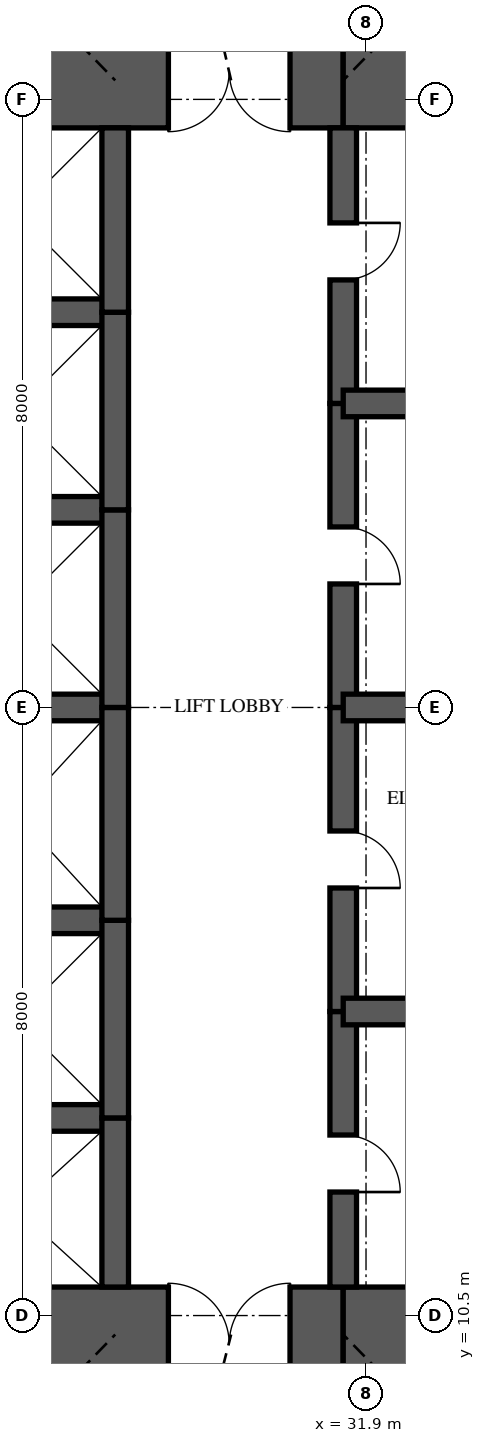
"""IFC4 building model, lengths in metres.
Left out: names, types, materials, properties, quantities, classifications, styles, units other than length and angle.
Written with IfcOpenShell. Run it as: python <this file> out.ifc"""

import sys

from ifc_helpers import new_model, si_unit, direction, frame, frame_2d, origin, place, context, subcontext, project, spatial, rectangle, extrude, element, fill, save


model = new_model("IFC4")
c1 = context("Model", 3, precision=1e-05, world=origin(), true_north=direction((0.0, 1.0)))
c2 = subcontext(c1, "Body", "Model", "MODEL_VIEW")
j1 = project(units=[si_unit("LENGTHUNIT", "METRE"), si_unit("PLANEANGLEUNIT", "RADIAN")], contexts=[c1])
p1 = place(None, origin())
s1 = spatial("IfcSite", under=j1, at=p1, CompositionType="ELEMENT")
p2 = place(p1, origin())
s2 = spatial("IfcBuilding", under=s1, at=p2, CompositionType="ELEMENT")
p3 = place(p2, frame((0.0, 0.0, 144.35)))
s3 = spatial("IfcBuildingStorey", under=s2, at=p3, CompositionType="ELEMENT", Elevation=144.35)
p4 = place(p3, frame((26.0, 10.125, 0.0), z_axis=(0.0, 0.0, 1.0), x_axis=(1.0, 0.0, 0.0)))
e1 = element("IfcWall", 1, at=p4, inside=s3, PredefinedType="SHEAR", context=c2, shape_type="SweptSolid", body=[
    extrude(rectangle(XDim=5.6, YDim=1.5, at=frame_2d((2.8, 0.0))), origin(), (0.0, 0.0, 1.0), 5.0),
])
p5 = place(p4, frame((3.3, 0.0, 0.0)))
e2 = element("IfcOpeningElement", 2, at=p5, cuts=e1, PredefinedType="OPENING", context=c2, shape_type="SweptSolid", body=[
    extrude(rectangle(XDim=1.6, YDim=2.1, at=frame_2d((0.8, 1.05))), frame((0.0, 0.76, 0.0), z_axis=(0.0, -1.0, 0.0), x_axis=(1.0, 0.0, 0.0)), (0.0, 0.0, 1.0), 1.52),
])
for number, where, z_axis, x_axis in (
    (3, (31.6, 10.125, 0.0), (0.0, 0.0, 1.0), (1.0, 0.0, 0.0)),
    (4, (35.9, 26.875, 0.0), (0.0, 0.0, 1.0), (-1.0, 0.0, 0.0)),
):
    element("IfcWall", number, at=place(p3, frame(where, z_axis=z_axis, x_axis=x_axis)), inside=s3, PredefinedType="SHEAR", context=c2, shape_type="SweptSolid", body=[
        extrude(rectangle(XDim=4.3, YDim=1.5, at=frame_2d((2.15, 0.0))), origin(), (0.0, 0.0, 1.0), 5.0),
    ])
p6 = place(p3, frame((31.6, 26.875, 0.0), z_axis=(0.0, 0.0, 1.0), x_axis=(-1.0, 0.0, 0.0)))
e5 = element("IfcWall", 5, at=p6, inside=s3, PredefinedType="SHEAR", context=c2, shape_type="SweptSolid", body=[
    extrude(rectangle(XDim=5.6, YDim=1.5, at=frame_2d((2.8, 0.0))), origin(), (0.0, 0.0, 1.0), 5.0),
])
p7 = place(p6, frame((0.7, 0.0, 0.0)))
e6 = element("IfcOpeningElement", 6, at=p7, cuts=e5, PredefinedType="OPENING", context=c2, shape_type="SweptSolid", body=[
    extrude(rectangle(XDim=1.6, YDim=2.1, at=frame_2d((0.8, 1.05))), frame((0.0, 0.76, 0.0), z_axis=(0.0, -1.0, 0.0), x_axis=(1.0, 0.0, 0.0)), (0.0, 0.0, 1.0), 1.52),
])
p8 = place(p3, frame((28.6, 10.875, 0.0), z_axis=(0.0, 0.0, 1.0), x_axis=(0.0, 1.0, 0.0)))
e7 = element("IfcWall", 7, at=p8, inside=s3, PredefinedType="SHEAR", context=c2, shape_type="SweptSolid", body=[
    extrude(rectangle(XDim=2.225, YDim=0.35, at=frame_2d((1.113, 0.0))), origin(), (0.0, 0.0, 1.0), 5.0),
])
p9 = place(p3, frame((28.6, 13.1, 0.0), z_axis=(0.0, 0.0, 1.0), x_axis=(0.0, 1.0, 0.0)))
e8 = element("IfcWall", 8, at=p9, inside=s3, PredefinedType="SHEAR", context=c2, shape_type="SweptSolid", body=[
    extrude(rectangle(XDim=2.6, YDim=0.35, at=frame_2d((1.3, 0.0))), origin(), (0.0, 0.0, 1.0), 5.0),
])
p10 = place(p3, frame((28.6, 15.7, 0.0), z_axis=(0.0, 0.0, 1.0), x_axis=(0.0, 1.0, 0.0)))
e9 = element("IfcWall", 9, at=p10, inside=s3, PredefinedType="SHEAR", context=c2, shape_type="SweptSolid", body=[
    extrude(rectangle(XDim=2.8, YDim=0.35, at=frame_2d((1.4, 0.0))), origin(), (0.0, 0.0, 1.0), 5.0),
])
p11 = place(p3, frame((28.6, 18.5, 0.0), z_axis=(0.0, 0.0, 1.0), x_axis=(0.0, 1.0, 0.0)))
e10 = element("IfcWall", 10, at=p11, inside=s3, PredefinedType="SHEAR", context=c2, shape_type="SweptSolid", body=[
    extrude(rectangle(XDim=2.6, YDim=0.35, at=frame_2d((1.3, 0.0))), origin(), (0.0, 0.0, 1.0), 5.0),
])
p12 = place(p3, frame((28.6, 21.1, 0.0), z_axis=(0.0, 0.0, 1.0), x_axis=(0.0, 1.0, 0.0)))
e11 = element("IfcWall", 11, at=p12, inside=s3, PredefinedType="SHEAR", context=c2, shape_type="SweptSolid", body=[
    extrude(rectangle(XDim=2.6, YDim=0.35, at=frame_2d((1.3, 0.0))), origin(), (0.0, 0.0, 1.0), 5.0),
])
p13 = place(p3, frame((28.6, 23.7, 0.0), z_axis=(0.0, 0.0, 1.0), x_axis=(0.0, 1.0, 0.0)))
e12 = element("IfcWall", 12, at=p13, inside=s3, PredefinedType="SHEAR", context=c2, shape_type="SweptSolid", body=[
    extrude(rectangle(XDim=2.425, YDim=0.35, at=frame_2d((1.212, 0.0))), origin(), (0.0, 0.0, 1.0), 5.0),
])
p14 = place(p3, frame((31.6, 10.875, 0.0), z_axis=(0.0, 0.0, 1.0), x_axis=(0.0, 1.0, 0.0)))
e13 = element("IfcWall", 13, at=p14, inside=s3, PredefinedType="SHEAR", context=c2, shape_type="SweptSolid", body=[
    extrude(rectangle(XDim=3.625, YDim=0.35, at=frame_2d((1.812, 0.0))), origin(), (0.0, 0.0, 1.0), 5.0),
])
p15 = place(p14, frame((1.25, 0.0, 0.0)))
e14 = element("IfcOpeningElement", 14, at=p15, cuts=e13, PredefinedType="OPENING", context=c2, shape_type="SweptSolid", body=[
    extrude(rectangle(XDim=0.75, YDim=2.1, at=frame_2d((0.375, 1.05))), frame((0.0, 0.185, 0.0), z_axis=(0.0, -1.0, 0.0), x_axis=(1.0, 0.0, 0.0)), (0.0, 0.0, 1.0), 0.37),
])
p16 = place(p3, frame((31.6, 14.5, 0.0), z_axis=(0.0, 0.0, 1.0), x_axis=(0.0, 1.0, 0.0)))
e15 = element("IfcWall", 15, at=p16, inside=s3, PredefinedType="SHEAR", context=c2, shape_type="SweptSolid", body=[
    extrude(rectangle(XDim=4.0, YDim=0.35, at=frame_2d((2.0, 0.0))), origin(), (0.0, 0.0, 1.0), 5.0),
])
p17 = place(p16, frame((1.625, 0.0, 0.0)))
e16 = element("IfcOpeningElement", 16, at=p17, cuts=e15, PredefinedType="OPENING", context=c2, shape_type="SweptSolid", body=[
    extrude(rectangle(XDim=0.75, YDim=2.1, at=frame_2d((0.375, 1.05))), frame((0.0, 0.185, 0.0), z_axis=(0.0, -1.0, 0.0), x_axis=(1.0, 0.0, 0.0)), (0.0, 0.0, 1.0), 0.37),
])
p18 = place(p3, frame((31.6, 18.5, 0.0), z_axis=(0.0, 0.0, 1.0), x_axis=(0.0, 1.0, 0.0)))
e17 = element("IfcWall", 17, at=p18, inside=s3, PredefinedType="SHEAR", context=c2, shape_type="SweptSolid", body=[
    extrude(rectangle(XDim=4.0, YDim=0.35, at=frame_2d((2.0, 0.0))), origin(), (0.0, 0.0, 1.0), 5.0),
])
p19 = place(p18, frame((1.625, 0.0, 0.0)))
e18 = element("IfcOpeningElement", 18, at=p19, cuts=e17, PredefinedType="OPENING", context=c2, shape_type="SweptSolid", body=[
    extrude(rectangle(XDim=0.75, YDim=2.1, at=frame_2d((0.375, 1.05))), frame((0.0, 0.185, 0.0), z_axis=(0.0, -1.0, 0.0), x_axis=(1.0, 0.0, 0.0)), (0.0, 0.0, 1.0), 0.37),
])
p20 = place(p3, frame((31.6, 22.5, 0.0), z_axis=(0.0, 0.0, 1.0), x_axis=(0.0, 1.0, 0.0)))
e19 = element("IfcWall", 19, at=p20, inside=s3, PredefinedType="SHEAR", context=c2, shape_type="SweptSolid", body=[
    extrude(rectangle(XDim=3.625, YDim=0.35, at=frame_2d((1.812, 0.0))), origin(), (0.0, 0.0, 1.0), 5.0),
])
p21 = place(p20, frame((1.625, 0.0, 0.0)))
e20 = element("IfcOpeningElement", 20, at=p21, cuts=e19, PredefinedType="OPENING", context=c2, shape_type="SweptSolid", body=[
    extrude(rectangle(XDim=0.75, YDim=2.1, at=frame_2d((0.375, 1.05))), frame((0.0, 0.185, 0.0), z_axis=(0.0, -1.0, 0.0), x_axis=(1.0, 0.0, 0.0)), (0.0, 0.0, 1.0), 0.37),
])
for number, where, z_axis, x_axis in (
    (21, (26.0, 13.1, 0.0), (0.0, 0.0, 1.0), (1.0, 0.0, 0.0)),
    (22, (26.0, 15.7, 0.0), (0.0, 0.0, 1.0), (1.0, 0.0, 0.0)),
    (23, (26.0, 18.5, 0.0), (0.0, 0.0, 1.0), (1.0, 0.0, 0.0)),
    (24, (26.0, 21.1, 0.0), (0.0, 0.0, 1.0), (1.0, 0.0, 0.0)),
    (25, (26.0, 23.7, 0.0), (0.0, 0.0, 1.0), (1.0, 0.0, 0.0)),
):
    element("IfcWall", number, at=place(p3, frame(where, z_axis=z_axis, x_axis=x_axis)), inside=s3, PredefinedType="SHEAR", context=c2, shape_type="SweptSolid", body=[
        extrude(rectangle(XDim=2.6, YDim=0.35, at=frame_2d((1.3, 0.0))), origin(), (0.0, 0.0, 1.0), 5.0),
    ])
for number, where, z_axis, x_axis in (
    (26, (31.6, 14.5, 0.0), (0.0, 0.0, 1.0), (1.0, 0.0, 0.0)),
    (27, (31.6, 18.5, 0.0), (0.0, 0.0, 1.0), (1.0, 0.0, 0.0)),
    (28, (31.6, 22.5, 0.0), (0.0, 0.0, 1.0), (1.0, 0.0, 0.0)),
):
    element("IfcWall", number, at=place(p3, frame(where, z_axis=z_axis, x_axis=x_axis)), inside=s3, PredefinedType="SHEAR", context=c2, shape_type="SweptSolid", body=[
        extrude(rectangle(XDim=4.3, YDim=0.35, at=frame_2d((2.15, 0.0))), origin(), (0.0, 0.0, 1.0), 5.0),
    ])
p22 = place(p5, origin())
e29 = element("IfcDoor", 29, at=p22, inside=s3, OperationType="DOUBLE_DOOR_SINGLE_SWING", PredefinedType="DOOR", context=c2, shape_type="SweptSolid", body=[
    extrude(rectangle(XDim=1.6, YDim=2.1, at=frame_2d((0.8, 1.05))), frame((0.0, 0.025, 0.0), z_axis=(0.0, -1.0, 0.0), x_axis=(1.0, 0.0, 0.0)), (0.0, 0.0, 1.0), 0.05),
])
fill(e2, e29)
p23 = place(p7, origin())
e30 = element("IfcDoor", 30, at=p23, inside=s3, OperationType="DOUBLE_DOOR_SINGLE_SWING", PredefinedType="DOOR", context=c2, shape_type="SweptSolid", body=[
    extrude(rectangle(XDim=1.6, YDim=2.1, at=frame_2d((0.8, 1.05))), frame((0.0, 0.025, 0.0), z_axis=(0.0, -1.0, 0.0), x_axis=(1.0, 0.0, 0.0)), (0.0, 0.0, 1.0), 0.05),
])
fill(e6, e30)
p24 = place(p15, frame((0.75, 0.0, 0.0), z_axis=(0.0, 0.0, 1.0), x_axis=(-1.0, 0.0, 0.0)))
e31 = element("IfcDoor", 31, at=p24, inside=s3, OperationType="SINGLE_SWING_RIGHT", PredefinedType="DOOR", context=c2, shape_type="SweptSolid", body=[
    extrude(rectangle(XDim=0.75, YDim=2.1, at=frame_2d((0.375, 1.05))), frame((0.0, 0.025, 0.0), z_axis=(0.0, -1.0, 0.0), x_axis=(1.0, 0.0, 0.0)), (0.0, 0.0, 1.0), 0.05),
])
fill(e14, e31)
p25 = place(p17, frame((0.75, 0.0, 0.0), z_axis=(0.0, 0.0, 1.0), x_axis=(-1.0, 0.0, 0.0)))
e32 = element("IfcDoor", 32, at=p25, inside=s3, OperationType="SINGLE_SWING_RIGHT", PredefinedType="DOOR", context=c2, shape_type="SweptSolid", body=[
    extrude(rectangle(XDim=0.75, YDim=2.1, at=frame_2d((0.375, 1.05))), frame((0.0, 0.025, 0.0), z_axis=(0.0, -1.0, 0.0), x_axis=(1.0, 0.0, 0.0)), (0.0, 0.0, 1.0), 0.05),
])
fill(e16, e32)
p26 = place(p19, frame((0.75, 0.0, 0.0), z_axis=(0.0, 0.0, 1.0), x_axis=(-1.0, 0.0, 0.0)))
e33 = element("IfcDoor", 33, at=p26, inside=s3, OperationType="SINGLE_SWING_RIGHT", PredefinedType="DOOR", context=c2, shape_type="SweptSolid", body=[
    extrude(rectangle(XDim=0.75, YDim=2.1, at=frame_2d((0.375, 1.05))), frame((0.0, 0.025, 0.0), z_axis=(0.0, -1.0, 0.0), x_axis=(1.0, 0.0, 0.0)), (0.0, 0.0, 1.0), 0.05),
])
fill(e18, e33)
p27 = place(p21, frame((0.75, 0.0, 0.0), z_axis=(0.0, 0.0, 1.0), x_axis=(-1.0, 0.0, 0.0)))
e34 = element("IfcDoor", 34, at=p27, inside=s3, OperationType="SINGLE_SWING_LEFT", PredefinedType="DOOR", context=c2, shape_type="SweptSolid", body=[
    extrude(rectangle(XDim=0.75, YDim=2.1, at=frame_2d((0.375, 1.05))), frame((0.0, 0.025, 0.0), z_axis=(0.0, -1.0, 0.0), x_axis=(1.0, 0.0, 0.0)), (0.0, 0.0, 1.0), 0.05),
])
fill(e20, e34)
save(model, sys.argv[1])
